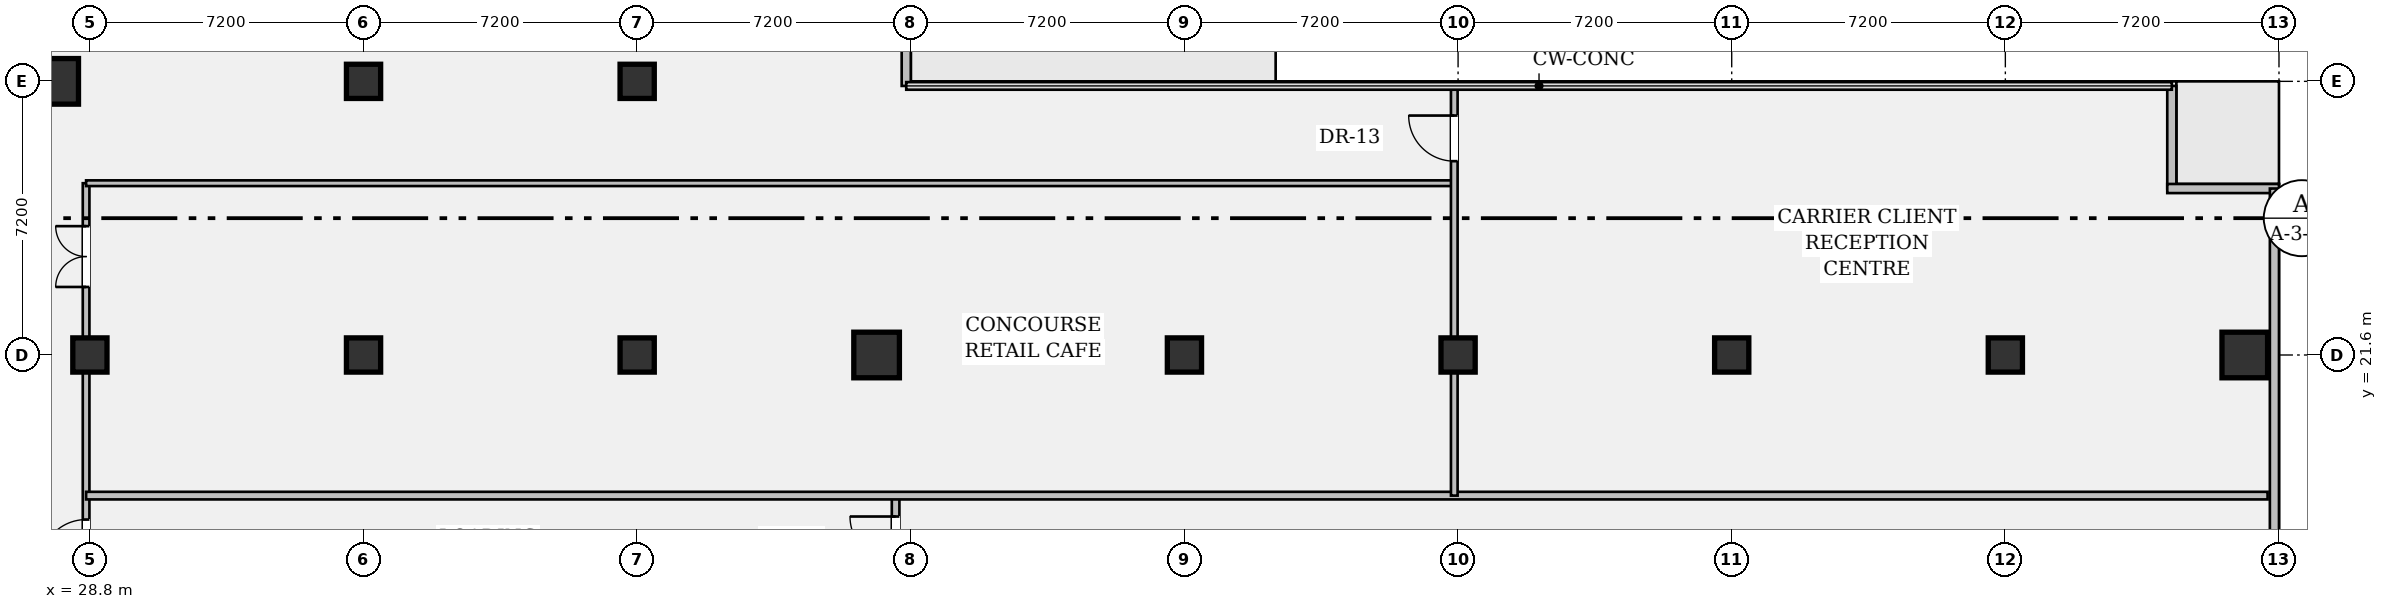
"""IFC4 building model, lengths in metres.
Left out: names, types, materials, properties, quantities, classifications, styles, units other than length and angle.
Written with IfcOpenShell. Run it as: python <this file> out.ifc"""

import sys

from ifc_helpers import new_model, si_unit, direction, frame, frame_2d, origin, origin_2d, place, context, subcontext, project, spatial, rectangle, hollow_rectangle, extrude, element, fill, save


model = new_model("IFC4")
c1 = context("Model", 3, precision=1e-05, world=origin(), true_north=direction((0.0, 1.0)))
c2 = subcontext(c1, "Body", "Model", "MODEL_VIEW")
j1 = project(units=[si_unit("LENGTHUNIT", "METRE"), si_unit("PLANEANGLEUNIT", "RADIAN")], contexts=[c1])
p1 = place(None, origin())
s1 = spatial("IfcSite", under=j1, at=p1, CompositionType="ELEMENT")
p2 = place(p1, origin())
s2 = spatial("IfcBuilding", under=s1, at=p2, CompositionType="ELEMENT")
p3 = place(p2, origin())
s3 = spatial("IfcBuildingStorey", under=s2, at=p3, CompositionType="ELEMENT", Elevation=0.0)
p4 = place(p3, frame((27.9, 28.8, 0.0), z_axis=(0.0, 0.0, 1.0), x_axis=(1.0, 0.0, 0.0)))
e1 = element("IfcColumn", 1, at=p4, inside=s3, PredefinedType="COLUMN", context=c2, shape_type="SweptSolid", body=[
    extrude(hollow_rectangle(XDim=1.2, YDim=1.2, WallThickness=0.075, at=origin_2d()), origin(), (0.0, 0.0, 1.0), 4.95),
])
for number, where, z_axis, x_axis in (
    (2, (28.8, 21.6, 0.0), (0.0, 0.0, 1.0), (1.0, 0.0, 0.0)),
    (3, (36.0, 21.6, 0.0), (0.0, 0.0, 1.0), (1.0, 0.0, 0.0)),
    (4, (36.0, 28.8, 0.0), (0.0, 0.0, 1.0), (1.0, 0.0, 0.0)),
    (5, (43.2, 21.6, 0.0), (0.0, 0.0, 1.0), (1.0, 0.0, 0.0)),
    (6, (43.2, 28.8, 0.0), (0.0, 0.0, 1.0), (1.0, 0.0, 0.0)),
):
    element("IfcColumn", number, at=place(p3, frame(where, z_axis=z_axis, x_axis=x_axis)), inside=s3, PredefinedType="COLUMN", context=c2, shape_type="SweptSolid", body=[
        extrude(rectangle(XDim=0.9, YDim=0.9, at=origin_2d()), origin(), (0.0, 0.0, 1.0), 4.95),
    ])
p5 = place(p3, frame((49.5, 21.6, 0.0), z_axis=(0.0, 0.0, 1.0), x_axis=(1.0, 0.0, 0.0)))
e7 = element("IfcColumn", 7, at=p5, inside=s3, PredefinedType="COLUMN", context=c2, shape_type="SweptSolid", body=[
    extrude(hollow_rectangle(XDim=1.2, YDim=1.2, WallThickness=0.075, at=origin_2d()), origin(), (0.0, 0.0, 1.0), 4.95),
])
for number, where, z_axis, x_axis in (
    (8, (57.6, 21.6, 0.0), (0.0, 0.0, 1.0), (1.0, 0.0, 0.0)),
    (9, (64.8, 21.6, 0.0), (0.0, 0.0, 1.0), (1.0, 0.0, 0.0)),
    (10, (72.0, 21.6, 0.0), (0.0, 0.0, 1.0), (1.0, 0.0, 0.0)),
    (11, (79.2, 21.6, 0.0), (0.0, 0.0, 1.0), (1.0, 0.0, 0.0)),
):
    element("IfcColumn", number, at=place(p3, frame(where, z_axis=z_axis, x_axis=x_axis)), inside=s3, PredefinedType="COLUMN", context=c2, shape_type="SweptSolid", body=[
        extrude(rectangle(XDim=0.9, YDim=0.9, at=origin_2d()), origin(), (0.0, 0.0, 1.0), 4.95),
    ])
p6 = place(p3, frame((85.5, 21.6, 0.0), z_axis=(0.0, 0.0, 1.0), x_axis=(1.0, 0.0, 0.0)))
e12 = element("IfcColumn", 12, at=p6, inside=s3, PredefinedType="COLUMN", context=c2, shape_type="SweptSolid", body=[
    extrude(hollow_rectangle(XDim=1.2, YDim=1.2, WallThickness=0.075, at=origin_2d()), origin(), (0.0, 0.0, 1.0), 4.95),
])
p7 = place(p3, frame((50.28, 47.58, 0.0), z_axis=(0.0, 0.0, 1.0), x_axis=(0.0, -1.0, 0.0)))
e13 = element("IfcWall", 13, at=p7, inside=s3, PredefinedType="STANDARD", context=c2, shape_type="SweptSolid", body=[
    extrude(rectangle(XDim=18.9, YDim=0.24, at=frame_2d((9.45, 0.0))), origin(), (0.0, 0.0, 1.0), 4.95),
])
p8 = place(p7, frame((15.98, 0.0, 0.0)))
e14 = element("IfcOpeningElement", 14, at=p8, cuts=e13, PredefinedType="OPENING", context=c2, shape_type="SweptSolid", body=[
    extrude(rectangle(XDim=1.8, YDim=2.2, at=frame_2d((0.9, 1.1))), frame((0.0, 0.132, 0.0), z_axis=(0.0, -1.0, 0.0), x_axis=(1.0, 0.0, 0.0)), (0.0, 0.0, 1.0), 0.264),
])
p9 = place(p3, frame((83.58, 28.68, 0.0), z_axis=(0.0, 0.0, 1.0), x_axis=(0.0, -1.0, 0.0)))
e15 = element("IfcWall", 15, at=p9, inside=s3, PredefinedType="STANDARD", context=c2, shape_type="SweptSolid", body=[
    extrude(rectangle(XDim=2.7, YDim=0.24, at=frame_2d((1.35, 0.0))), origin(), (0.0, 0.0, 1.0), 4.95),
])
p10 = place(p3, frame((83.46, 25.98, 0.0), z_axis=(0.0, 0.0, 1.0), x_axis=(1.0, 0.0, 0.0)))
e16 = element("IfcWall", 16, at=p10, inside=s3, PredefinedType="STANDARD", context=c2, shape_type="SweptSolid", body=[
    extrude(rectangle(XDim=2.94, YDim=0.24, at=frame_2d((1.47, 0.0))), origin(), (0.0, 0.0, 1.0), 4.95),
])
p11 = place(p3, frame((86.28, 25.98, 0.0), z_axis=(0.0, 0.0, 1.0), x_axis=(0.0, -1.0, 0.0)))
e17 = element("IfcWall", 17, at=p11, inside=s3, PredefinedType="STANDARD", context=c2, shape_type="SweptSolid", body=[
    extrude(rectangle(XDim=23.16, YDim=0.24, at=frame_2d((11.58, 0.0))), origin(), (0.0, 0.0, 1.0), 4.95),
])
p12 = place(p11, frame((16.58, 0.0, 0.0)))
e18 = element("IfcOpeningElement", 18, at=p12, cuts=e17, PredefinedType="OPENING", context=c2, shape_type="SweptSolid", body=[
    extrude(rectangle(XDim=6.4, YDim=4.0, at=frame_2d((3.2, 2.0))), frame((0.0, 0.132, 0.0), z_axis=(0.0, -1.0, 0.0), x_axis=(1.0, 0.0, 0.0)), (0.0, 0.0, 1.0), 0.264),
])
p13 = place(p11, frame((12.68, 0.0, 0.0)))
e19 = element("IfcOpeningElement", 19, at=p13, cuts=e17, PredefinedType="OPENING", context=c2, shape_type="SweptSolid", body=[
    extrude(rectangle(XDim=3.5, YDim=3.9, at=frame_2d((1.75, 1.95))), frame((0.0, 0.132, 0.0), z_axis=(0.0, -1.0, 0.0), x_axis=(1.0, 0.0, 0.0)), (0.0, 0.0, 1.0), 0.264),
])
p14 = place(p3, frame((28.7, 0.15, 0.0), z_axis=(0.0, 0.0, 1.0), x_axis=(0.0, 1.0, 0.0)))
e20 = element("IfcWall", 20, at=p14, inside=s3, PredefinedType="PARTITIONING", context=c2, shape_type="SweptSolid", body=[
    extrude(rectangle(XDim=25.97, YDim=0.175, at=frame_2d((12.985, 0.0))), origin(), (0.0, 0.0, 1.0), 3.988),
])
p15 = place(p14, frame((11.2, 0.0, 0.0)))
e21 = element("IfcOpeningElement", 21, at=p15, cuts=e20, PredefinedType="OPENING", context=c2, shape_type="SweptSolid", body=[
    extrude(rectangle(XDim=1.1, YDim=2.15, at=frame_2d((0.55, 1.075))), frame((0.0, 0.1, 0.0), z_axis=(0.0, -1.0, 0.0), x_axis=(1.0, 0.0, 0.0)), (0.0, 0.0, 1.0), 0.199),
])
p16 = place(p14, frame((15.92, 0.0, 0.0)))
e22 = element("IfcOpeningElement", 22, at=p16, cuts=e20, PredefinedType="OPENING", context=c2, shape_type="SweptSolid", body=[
    extrude(rectangle(XDim=1.2, YDim=2.15, at=frame_2d((0.6, 1.075))), frame((0.0, 0.1, 0.0), z_axis=(0.0, -1.0, 0.0), x_axis=(1.0, 0.0, 0.0)), (0.0, 0.0, 1.0), 0.199),
])
p17 = place(p14, frame((23.24, 0.0, 0.0)))
e23 = element("IfcOpeningElement", 23, at=p17, cuts=e20, PredefinedType="OPENING", context=c2, shape_type="SweptSolid", body=[
    extrude(rectangle(XDim=1.6, YDim=2.2, at=frame_2d((0.8, 1.1))), frame((0.0, 0.1, 0.0), z_axis=(0.0, -1.0, 0.0), x_axis=(1.0, 0.0, 0.0)), (0.0, 0.0, 1.0), 0.199),
])
p18 = place(p14, frame((3.6, 0.0, 0.0)))
e24 = element("IfcOpeningElement", 24, at=p18, cuts=e20, PredefinedType="OPENING", context=c2, shape_type="SweptSolid", body=[
    extrude(rectangle(XDim=1.1, YDim=2.15, at=frame_2d((0.55, 1.075))), frame((0.0, 0.1, 0.0), z_axis=(0.0, -1.0, 0.0), x_axis=(1.0, 0.0, 0.0)), (0.0, 0.0, 1.0), 0.199),
])
p19 = place(p3, frame((50.0, 9.55, 0.0), z_axis=(0.0, 0.0, 1.0), x_axis=(0.0, 1.0, 0.0)))
e25 = element("IfcWall", 25, at=p19, inside=s3, PredefinedType="PARTITIONING", context=c2, shape_type="SweptSolid", body=[
    extrude(rectangle(XDim=8.35, YDim=0.2, at=frame_2d((4.175, 0.0))), origin(), (0.0, 0.0, 1.0), 2.535),
])
p20 = place(p19, frame((6.6, 0.0, 0.0)))
e26 = element("IfcOpeningElement", 26, at=p20, cuts=e25, PredefinedType="OPENING", context=c2, shape_type="SweptSolid", body=[
    extrude(rectangle(XDim=1.2, YDim=2.15, at=frame_2d((0.6, 1.075))), frame((0.0, 0.112, 0.0), z_axis=(0.0, -1.0, 0.0), x_axis=(1.0, 0.0, 0.0)), (0.0, 0.0, 1.0), 0.224),
])
p21 = place(p3, frame((28.7, 17.9, 0.0), z_axis=(0.0, 0.0, 1.0), x_axis=(1.0, 0.0, 0.0)))
e27 = element("IfcWall", 27, at=p21, inside=s3, PredefinedType="PARTITIONING", context=c2, shape_type="SweptSolid", body=[
    extrude(rectangle(XDim=57.4, YDim=0.2, at=frame_2d((28.7, 0.0))), origin(), (0.0, 0.0, 1.0), 3.988),
])
p22 = place(p3, frame((28.7, 26.12, 0.0), z_axis=(0.0, 0.0, 1.0), x_axis=(1.0, 0.0, 0.0)))
e28 = element("IfcWall", 28, at=p22, inside=s3, PredefinedType="PARTITIONING", context=c2, shape_type="SweptSolid", body=[
    extrude(rectangle(XDim=36.0, YDim=0.15, at=frame_2d((18.0, 0.0))), origin(), (0.0, 0.0, 1.0), 3.988),
])
p23 = place(p3, frame((64.7, 17.9, 0.0), z_axis=(0.0, 0.0, 1.0), x_axis=(0.0, 1.0, 0.0)))
e29 = element("IfcWall", 29, at=p23, inside=s3, PredefinedType="PARTITIONING", context=c2, shape_type="SweptSolid", body=[
    extrude(rectangle(XDim=10.78, YDim=0.175, at=frame_2d((5.39, 0.0))), origin(), (0.0, 0.0, 1.0), 3.988),
])
p24 = place(p23, frame((8.8, 0.0, 0.0)))
e30 = element("IfcOpeningElement", 30, at=p24, cuts=e29, PredefinedType="OPENING", context=c2, shape_type="SweptSolid", body=[
    extrude(rectangle(XDim=1.2, YDim=2.15, at=frame_2d((0.6, 1.075))), frame((0.0, 0.1, 0.0), z_axis=(0.0, -1.0, 0.0), x_axis=(1.0, 0.0, 0.0)), (0.0, 0.0, 1.0), 0.199),
])
p25 = place(p16, origin())
e31 = element("IfcDoor", 31, at=p25, inside=s3, OperationType="SINGLE_SWING_LEFT", PredefinedType="DOOR", context=c2, shape_type="SweptSolid", body=[
    extrude(rectangle(XDim=1.2, YDim=2.15, at=frame_2d((0.6, 1.075))), frame((0.0, 0.025, 0.0), z_axis=(0.0, -1.0, 0.0), x_axis=(1.0, 0.0, 0.0)), (0.0, 0.0, 1.0), 0.05),
])
fill(e22, e31)
p26 = place(p20, origin())
e32 = element("IfcDoor", 32, at=p26, inside=s3, OperationType="SINGLE_SWING_RIGHT", PredefinedType="DOOR", context=c2, shape_type="SweptSolid", body=[
    extrude(rectangle(XDim=1.2, YDim=2.15, at=frame_2d((0.6, 1.075))), frame((0.0, 0.025, 0.0), z_axis=(0.0, -1.0, 0.0), x_axis=(1.0, 0.0, 0.0)), (0.0, 0.0, 1.0), 0.05),
])
fill(e26, e32)
p27 = place(p17, origin())
e33 = element("IfcDoor", 33, at=p27, inside=s3, OperationType="DOUBLE_DOOR_SINGLE_SWING", PredefinedType="DOOR", context=c2, shape_type="SweptSolid", body=[
    extrude(rectangle(XDim=1.6, YDim=2.2, at=frame_2d((0.8, 1.1))), frame((0.0, 0.025, 0.0), z_axis=(0.0, -1.0, 0.0), x_axis=(1.0, 0.0, 0.0)), (0.0, 0.0, 1.0), 0.05),
])
fill(e23, e33)
p28 = place(p24, origin())
e34 = element("IfcDoor", 34, at=p28, inside=s3, OperationType="SINGLE_SWING_RIGHT", PredefinedType="DOOR", context=c2, shape_type="SweptSolid", body=[
    extrude(rectangle(XDim=1.2, YDim=2.15, at=frame_2d((0.6, 1.075))), frame((0.0, 0.025, 0.0), z_axis=(0.0, -1.0, 0.0), x_axis=(1.0, 0.0, 0.0)), (0.0, 0.0, 1.0), 0.05),
])
fill(e30, e34)
save(model, sys.argv[1])
